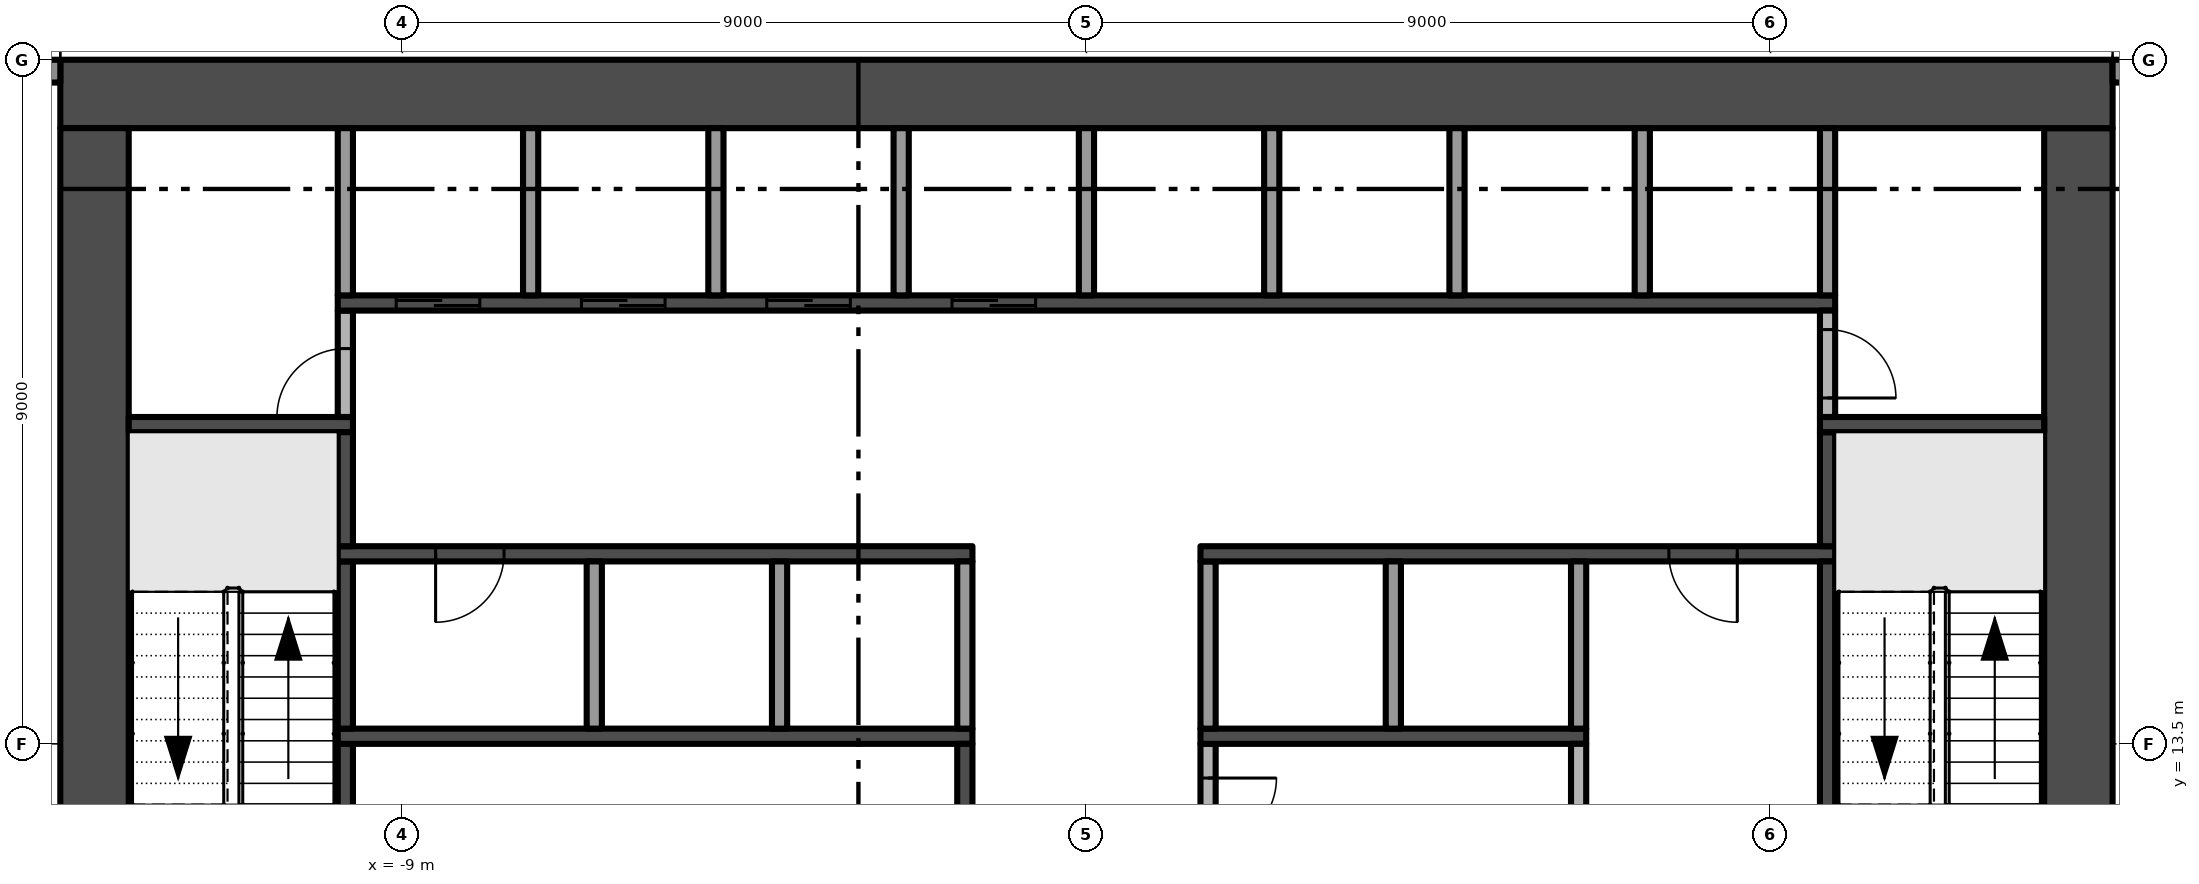
"""IFC4 building model, lengths in metres.
Left out: names, types, materials, properties, quantities, classifications, styles, units other than length and angle.
Written with IfcOpenShell. Run it as: python <this file> out.ifc"""

import sys

from ifc_helpers import new_model, si_unit, direction, frame, frame_2d, origin, place, context, subcontext, project, spatial, rectangle, extrude, element, fill, save


model = new_model("IFC4")
c1 = context("Model", 3, precision=1e-05, world=origin(), true_north=direction((0.0, 1.0)))
c2 = subcontext(c1, "Body", "Model", "MODEL_VIEW")
j1 = project(units=[si_unit("LENGTHUNIT", "METRE"), si_unit("PLANEANGLEUNIT", "RADIAN")], contexts=[c1])
p1 = place(None, origin())
s1 = spatial("IfcSite", under=j1, at=p1, CompositionType="ELEMENT")
p2 = place(p1, origin())
s2 = spatial("IfcBuilding", under=s1, at=p2, CompositionType="ELEMENT")
p3 = place(p2, frame((0.0, 0.0, 69.4)))
s3 = spatial("IfcBuildingStorey", under=s2, at=p3, CompositionType="ELEMENT", Elevation=69.4)
p4 = place(p3, frame((13.05, 5.4, -0.3), z_axis=(0.0, 0.0, 1.0), x_axis=(0.0, 1.0, 0.0)))
e1 = element("IfcWall", 1, at=p4, inside=s3, PredefinedType="SHEAR", context=c2, shape_type="SweptSolid", body=[
    extrude(rectangle(XDim=16.2, YDim=0.9, at=frame_2d((8.1, 0.0))), origin(), (0.0, 0.0, 1.0), 3.8),
])
p5 = place(p4, frame((6.0, 0.0, 0.3)))
e2 = element("IfcOpeningElement", 2, at=p5, cuts=e1, PredefinedType="OPENING", context=c2, shape_type="SweptSolid", body=[
    extrude(rectangle(XDim=1.2, YDim=2.2, at=frame_2d((0.6, 1.1))), frame((0.0, 0.46, 0.0), z_axis=(0.0, -1.0, 0.0), x_axis=(1.0, 0.0, 0.0)), (0.0, 0.0, 1.0), 0.92),
])
p6 = place(p3, frame((13.5, 22.05, -0.3), z_axis=(0.0, 0.0, 1.0), x_axis=(-1.0, 0.0, 0.0)))
e3 = element("IfcWall", 3, at=p6, inside=s3, PredefinedType="SHEAR", context=c2, shape_type="SweptSolid", body=[
    extrude(rectangle(XDim=27.0, YDim=0.9, at=frame_2d((13.5, 0.0))), origin(), (0.0, 0.0, 1.0), 3.8),
])
p7 = place(p3, frame((-13.05, 21.6, -0.3), z_axis=(0.0, 0.0, 1.0), x_axis=(0.0, -1.0, 0.0)))
e4 = element("IfcWall", 4, at=p7, inside=s3, PredefinedType="SHEAR", context=c2, shape_type="SweptSolid", body=[
    extrude(rectangle(XDim=16.2, YDim=0.9, at=frame_2d((8.1, 0.0))), origin(), (0.0, 0.0, 1.0), 3.8),
])
p8 = place(p7, frame((9.0, 0.0, 0.3)))
e5 = element("IfcOpeningElement", 5, at=p8, cuts=e4, PredefinedType="OPENING", context=c2, shape_type="SweptSolid", body=[
    extrude(rectangle(XDim=1.2, YDim=2.2, at=frame_2d((0.6, 1.1))), frame((0.0, 0.46, 0.0), z_axis=(0.0, -1.0, 0.0), x_axis=(1.0, 0.0, 0.0)), (0.0, 0.0, 1.0), 0.92),
])
p9 = place(p3, frame((13.5, 22.35, 0.0), z_axis=(0.0, 0.0, 1.0), x_axis=(1.0, 0.0, 0.0)))
e6 = element("IfcWall", 6, at=p9, inside=s3, PredefinedType="SOLIDWALL", context=c2, shape_type="SweptSolid", body=[
    extrude(rectangle(XDim=3.825, YDim=0.3, at=frame_2d((1.913, 0.0))), origin(), (0.0, 0.0, 1.0), 3.5),
])
p10 = place(p9, frame((0.775, 0.0, 0.0)))
e7 = element("IfcOpeningElement", 7, at=p10, cuts=e6, PredefinedType="OPENING", context=c2, shape_type="SweptSolid", body=[
    extrude(rectangle(XDim=2.725, YDim=2.4, at=frame_2d((1.363, 1.2))), frame((0.0, 0.16, 0.0), z_axis=(0.0, -1.0, 0.0), x_axis=(1.0, 0.0, 0.0)), (0.0, 0.0, 1.0), 0.32),
])
p11 = place(p3, frame((-17.325, 22.35, 0.0), z_axis=(0.0, 0.0, 1.0), x_axis=(1.0, 0.0, 0.0)))
e8 = element("IfcWall", 8, at=p11, inside=s3, PredefinedType="SOLIDWALL", context=c2, shape_type="SweptSolid", body=[
    extrude(rectangle(XDim=3.825, YDim=0.3, at=frame_2d((1.913, 0.0))), origin(), (0.0, 0.0, 1.0), 3.5),
])
p12 = place(p11, frame((0.325, 0.0, 0.45)))
e9 = element("IfcOpeningElement", 9, at=p12, cuts=e8, PredefinedType="OPENING", context=c2, shape_type="SweptSolid", body=[
    extrude(rectangle(XDim=2.725, YDim=2.65, at=frame_2d((1.363, 1.325))), frame((0.0, 0.16, 0.0), z_axis=(0.0, -1.0, 0.0), x_axis=(1.0, 0.0, 0.0)), (0.0, 0.0, 1.0), 0.32),
])
p13 = place(p3, frame((-12.6, 17.7, 0.0), z_axis=(0.0, 0.0, 1.0), x_axis=(1.0, 0.0, 0.0)))
e10 = element("IfcWall", 10, at=p13, inside=s3, PredefinedType="SHEAR", context=c2, shape_type="SweptSolid", body=[
    extrude(rectangle(XDim=2.95, YDim=0.2, at=frame_2d((1.475, 0.0))), origin(), (0.0, 0.0, 1.0), 3.5),
])
p14 = place(p3, frame((-9.75, 10.2, 0.0), z_axis=(0.0, 0.0, 1.0), x_axis=(0.0, 1.0, 0.0)))
e11 = element("IfcWall", 11, at=p14, inside=s3, PredefinedType="SHEAR", context=c2, shape_type="SweptSolid", body=[
    extrude(rectangle(XDim=3.3, YDim=0.2, at=frame_2d((1.65, 0.0))), origin(), (0.0, 0.0, 1.0), 3.5),
])
p15 = place(p3, frame((-9.85, 13.6, 0.0), z_axis=(0.0, 0.0, 1.0), x_axis=(1.0, 0.0, 0.0)))
e12 = element("IfcWall", 12, at=p15, inside=s3, PredefinedType="SHEAR", context=c2, shape_type="SweptSolid", body=[
    extrude(rectangle(XDim=8.35, YDim=0.2, at=frame_2d((4.175, 0.0))), origin(), (0.0, 0.0, 1.0), 3.5),
])
p16 = place(p3, frame((-9.75, 13.7, 0.0), z_axis=(0.0, 0.0, 1.0), x_axis=(0.0, 1.0, 0.0)))
e13 = element("IfcWall", 13, at=p16, inside=s3, PredefinedType="SHEAR", context=c2, shape_type="SweptSolid", body=[
    extrude(rectangle(XDim=2.2, YDim=0.2, at=frame_2d((1.1, 0.0))), origin(), (0.0, 0.0, 1.0), 3.5),
])
p17 = place(p3, frame((-1.5, 16.0, 0.0), z_axis=(0.0, 0.0, 1.0), x_axis=(-1.0, 0.0, 0.0)))
e14 = element("IfcWall", 14, at=p17, inside=s3, PredefinedType="SHEAR", context=c2, shape_type="SweptSolid", body=[
    extrude(rectangle(XDim=8.35, YDim=0.2, at=frame_2d((4.175, 0.0))), origin(), (0.0, 0.0, 1.0), 3.5),
])
p18 = place(p17, frame((6.162, 0.0, 0.0)))
e15 = element("IfcOpeningElement", 15, at=p18, cuts=e14, PredefinedType="OPENING", context=c2, shape_type="SweptSolid", body=[
    extrude(rectangle(XDim=0.9, YDim=2.1, at=frame_2d((0.45, 1.05))), frame((0.0, 0.11, 0.0), z_axis=(0.0, -1.0, 0.0), x_axis=(1.0, 0.0, 0.0)), (0.0, 0.0, 1.0), 0.22),
])
p19 = place(p3, frame((-9.75, 16.1, 0.0), z_axis=(0.0, 0.0, 1.0), x_axis=(0.0, 1.0, 0.0)))
e16 = element("IfcWall", 16, at=p19, inside=s3, PredefinedType="SHEAR", context=c2, shape_type="SweptSolid", body=[
    extrude(rectangle(XDim=1.5, YDim=0.2, at=frame_2d((0.75, 0.0))), origin(), (0.0, 0.0, 1.0), 3.5),
])
p20 = place(p3, frame((-9.75, 17.8, 0.0), z_axis=(0.0, 0.0, 1.0), x_axis=(0.0, 1.0, 0.0)))
e17 = element("IfcWall", 17, at=p20, inside=s3, PredefinedType="PARTITIONING", context=c2, shape_type="SweptSolid", body=[
    extrude(rectangle(XDim=1.4, YDim=0.2, at=frame_2d((0.7, 0.0))), origin(), (0.0, 0.0, 1.0), 3.5),
])
p21 = place(p20, origin())
e18 = element("IfcOpeningElement", 18, at=p21, cuts=e17, PredefinedType="OPENING", context=c2, shape_type="SweptSolid", body=[
    extrude(rectangle(XDim=0.9, YDim=2.1, at=frame_2d((0.45, 1.05))), frame((0.0, 0.11, 0.0), z_axis=(0.0, -1.0, 0.0), x_axis=(1.0, 0.0, 0.0)), (0.0, 0.0, 1.0), 0.22),
])
p22 = place(p3, frame((-9.85, 19.3, 0.0), z_axis=(0.0, 0.0, 1.0), x_axis=(1.0, 0.0, 0.0)))
e19 = element("IfcWall", 19, at=p22, inside=s3, PredefinedType="SHEAR", context=c2, shape_type="SweptSolid", body=[
    extrude(rectangle(XDim=19.7, YDim=0.2, at=frame_2d((9.85, 0.0))), origin(), (0.0, 0.0, 1.0), 3.5),
])
p23 = place(p22, frame((0.769, 0.0, 0.0)))
e20 = element("IfcOpeningElement", 20, at=p23, cuts=e19, PredefinedType="OPENING", context=c2, shape_type="SweptSolid", body=[
    extrude(rectangle(XDim=1.1, YDim=2.1, at=frame_2d((0.55, 1.05))), frame((0.0, 0.11, 0.0), z_axis=(0.0, -1.0, 0.0), x_axis=(1.0, 0.0, 0.0)), (0.0, 0.0, 1.0), 0.22),
])
p24 = place(p22, frame((3.206, 0.0, 0.0)))
e21 = element("IfcOpeningElement", 21, at=p24, cuts=e19, PredefinedType="OPENING", context=c2, shape_type="SweptSolid", body=[
    extrude(rectangle(XDim=1.1, YDim=2.1, at=frame_2d((0.55, 1.05))), frame((0.0, 0.11, 0.0), z_axis=(0.0, -1.0, 0.0), x_axis=(1.0, 0.0, 0.0)), (0.0, 0.0, 1.0), 0.22),
])
p25 = place(p22, frame((5.644, 0.0, 0.0)))
e22 = element("IfcOpeningElement", 22, at=p25, cuts=e19, PredefinedType="OPENING", context=c2, shape_type="SweptSolid", body=[
    extrude(rectangle(XDim=1.1, YDim=2.1, at=frame_2d((0.55, 1.05))), frame((0.0, 0.11, 0.0), z_axis=(0.0, -1.0, 0.0), x_axis=(1.0, 0.0, 0.0)), (0.0, 0.0, 1.0), 0.22),
])
p26 = place(p22, frame((8.081, 0.0, 0.0)))
e23 = element("IfcOpeningElement", 23, at=p26, cuts=e19, PredefinedType="OPENING", context=c2, shape_type="SweptSolid", body=[
    extrude(rectangle(XDim=1.1, YDim=2.1, at=frame_2d((0.55, 1.05))), frame((0.0, 0.11, 0.0), z_axis=(0.0, -1.0, 0.0), x_axis=(1.0, 0.0, 0.0)), (0.0, 0.0, 1.0), 0.22),
])
for number, where, z_axis, x_axis in (
    (24, (-9.75, 19.4, 0.0), (0.0, 0.0, 1.0), (0.0, 1.0, 0.0)),
    (25, (-7.312, 19.4, 0.0), (0.0, 0.0, 1.0), (0.0, 1.0, 0.0)),
    (26, (-6.475, 13.7, 0.0), (0.0, 0.0, 1.0), (0.0, 1.0, 0.0)),
    (27, (-4.875, 19.4, 0.0), (0.0, 0.0, 1.0), (0.0, 1.0, 0.0)),
    (28, (-4.037, 13.7, 0.0), (0.0, 0.0, 1.0), (0.0, 1.0, 0.0)),
    (29, (-2.438, 19.4, 0.0), (0.0, 0.0, 1.0), (0.0, 1.0, 0.0)),
):
    element("IfcWall", number, at=place(p3, frame(where, z_axis=z_axis, x_axis=x_axis)), inside=s3, PredefinedType="PARTITIONING", context=c2, shape_type="SweptSolid", body=[
        extrude(rectangle(XDim=2.2, YDim=0.2, at=frame_2d((1.1, 0.0))), origin(), (0.0, 0.0, 1.0), 3.5),
    ])
p27 = place(p3, frame((-1.6, 8.15, 0.0), z_axis=(0.0, 0.0, 1.0), x_axis=(0.0, 1.0, 0.0)))
e30 = element("IfcWall", 30, at=p27, inside=s3, PredefinedType="SHEAR", context=c2, shape_type="SweptSolid", body=[
    extrude(rectangle(XDim=5.35, YDim=0.2, at=frame_2d((2.675, 0.0))), origin(), (0.0, 0.0, 1.0), 3.5),
])
p28 = place(p27, frame((2.225, 0.0, 0.0)))
e31 = element("IfcOpeningElement", 31, at=p28, cuts=e30, PredefinedType="OPENING", context=c2, shape_type="SweptSolid", body=[
    extrude(rectangle(XDim=0.9, YDim=2.1, at=frame_2d((0.45, 1.05))), frame((0.0, 0.11, 0.0), z_axis=(0.0, -1.0, 0.0), x_axis=(1.0, 0.0, 0.0)), (0.0, 0.0, 1.0), 0.22),
])
for number, where, z_axis, x_axis in (
    (32, (-1.6, 13.7, 0.0), (0.0, 0.0, 1.0), (0.0, 1.0, 0.0)),
    (33, (0.0, 19.4, 0.0), (0.0, 0.0, 1.0), (0.0, 1.0, 0.0)),
):
    element("IfcWall", number, at=place(p3, frame(where, z_axis=z_axis, x_axis=x_axis)), inside=s3, PredefinedType="PARTITIONING", context=c2, shape_type="SweptSolid", body=[
        extrude(rectangle(XDim=2.2, YDim=0.2, at=frame_2d((1.1, 0.0))), origin(), (0.0, 0.0, 1.0), 3.5),
    ])
p29 = place(p3, frame((1.6, 13.5, 0.0), z_axis=(0.0, 0.0, 1.0), x_axis=(0.0, -1.0, 0.0)))
e34 = element("IfcWall", 34, at=p29, inside=s3, PredefinedType="PARTITIONING", context=c2, shape_type="SweptSolid", body=[
    extrude(rectangle(XDim=1.8, YDim=0.2, at=frame_2d((0.9, 0.0))), origin(), (0.0, 0.0, 1.0), 3.5),
])
p30 = place(p29, frame((0.45, 0.0, 0.0)))
e35 = element("IfcOpeningElement", 35, at=p30, cuts=e34, PredefinedType="OPENING", context=c2, shape_type="SweptSolid", body=[
    extrude(rectangle(XDim=0.9, YDim=2.1, at=frame_2d((0.45, 1.05))), frame((0.0, 0.11, 0.0), z_axis=(0.0, -1.0, 0.0), x_axis=(1.0, 0.0, 0.0)), (0.0, 0.0, 1.0), 0.22),
])
p31 = place(p3, frame((1.5, 13.6, 0.0), z_axis=(0.0, 0.0, 1.0), x_axis=(1.0, 0.0, 0.0)))
e36 = element("IfcWall", 36, at=p31, inside=s3, PredefinedType="SHEAR", context=c2, shape_type="SweptSolid", body=[
    extrude(rectangle(XDim=5.075, YDim=0.2, at=frame_2d((2.538, 0.0))), origin(), (0.0, 0.0, 1.0), 3.5),
])
p32 = place(p3, frame((1.6, 13.7, 0.0), z_axis=(0.0, 0.0, 1.0), x_axis=(0.0, 1.0, 0.0)))
e37 = element("IfcWall", 37, at=p32, inside=s3, PredefinedType="PARTITIONING", context=c2, shape_type="SweptSolid", body=[
    extrude(rectangle(XDim=2.2, YDim=0.2, at=frame_2d((1.1, 0.0))), origin(), (0.0, 0.0, 1.0), 3.5),
])
p33 = place(p3, frame((9.85, 16.0, 0.0), z_axis=(0.0, 0.0, 1.0), x_axis=(-1.0, 0.0, 0.0)))
e38 = element("IfcWall", 38, at=p33, inside=s3, PredefinedType="SHEAR", context=c2, shape_type="SweptSolid", body=[
    extrude(rectangle(XDim=8.35, YDim=0.2, at=frame_2d((4.175, 0.0))), origin(), (0.0, 0.0, 1.0), 3.5),
])
p34 = place(p33, frame((1.288, 0.0, 0.0)))
e39 = element("IfcOpeningElement", 39, at=p34, cuts=e38, PredefinedType="OPENING", context=c2, shape_type="SweptSolid", body=[
    extrude(rectangle(XDim=0.9, YDim=2.1, at=frame_2d((0.45, 1.05))), frame((0.0, 0.11, 0.0), z_axis=(0.0, -1.0, 0.0), x_axis=(1.0, 0.0, 0.0)), (0.0, 0.0, 1.0), 0.22),
])
for number, where, z_axis, x_axis in (
    (40, (2.438, 19.4, 0.0), (0.0, 0.0, 1.0), (0.0, 1.0, 0.0)),
    (41, (4.037, 13.7, 0.0), (0.0, 0.0, 1.0), (0.0, 1.0, 0.0)),
    (42, (4.875, 19.4, 0.0), (0.0, 0.0, 1.0), (0.0, 1.0, 0.0)),
):
    element("IfcWall", number, at=place(p3, frame(where, z_axis=z_axis, x_axis=x_axis)), inside=s3, PredefinedType="PARTITIONING", context=c2, shape_type="SweptSolid", body=[
        extrude(rectangle(XDim=2.2, YDim=0.2, at=frame_2d((1.1, 0.0))), origin(), (0.0, 0.0, 1.0), 3.5),
    ])
p35 = place(p3, frame((6.475, 12.3, 0.0), z_axis=(0.0, 0.0, 1.0), x_axis=(0.0, 1.0, 0.0)))
e43 = element("IfcWall", 43, at=p35, inside=s3, PredefinedType="PARTITIONING", context=c2, shape_type="SweptSolid", body=[
    extrude(rectangle(XDim=1.2, YDim=0.2, at=frame_2d((0.6, 0.0))), origin(), (0.0, 0.0, 1.0), 3.5),
])
for number, where, z_axis, x_axis in (
    (44, (6.475, 13.7, 0.0), (0.0, 0.0, 1.0), (0.0, 1.0, 0.0)),
    (45, (7.312, 19.4, 0.0), (0.0, 0.0, 1.0), (0.0, 1.0, 0.0)),
):
    element("IfcWall", number, at=place(p3, frame(where, z_axis=z_axis, x_axis=x_axis)), inside=s3, PredefinedType="PARTITIONING", context=c2, shape_type="SweptSolid", body=[
        extrude(rectangle(XDim=2.2, YDim=0.2, at=frame_2d((1.1, 0.0))), origin(), (0.0, 0.0, 1.0), 3.5),
    ])
p36 = place(p3, frame((9.75, 12.3, 0.0), z_axis=(0.0, 0.0, 1.0), x_axis=(0.0, 1.0, 0.0)))
e46 = element("IfcWall", 46, at=p36, inside=s3, PredefinedType="SHEAR", context=c2, shape_type="SweptSolid", body=[
    extrude(rectangle(XDim=3.6, YDim=0.2, at=frame_2d((1.8, 0.0))), origin(), (0.0, 0.0, 1.0), 3.5),
])
p37 = place(p3, frame((9.75, 16.1, 0.0), z_axis=(0.0, 0.0, 1.0), x_axis=(0.0, 1.0, 0.0)))
e47 = element("IfcWall", 47, at=p37, inside=s3, PredefinedType="SHEAR", context=c2, shape_type="SweptSolid", body=[
    extrude(rectangle(XDim=1.5, YDim=0.2, at=frame_2d((0.75, 0.0))), origin(), (0.0, 0.0, 1.0), 3.5),
])
p38 = place(p3, frame((9.65, 17.7, 0.0), z_axis=(0.0, 0.0, 1.0), x_axis=(1.0, 0.0, 0.0)))
e48 = element("IfcWall", 48, at=p38, inside=s3, PredefinedType="SHEAR", context=c2, shape_type="SweptSolid", body=[
    extrude(rectangle(XDim=2.95, YDim=0.2, at=frame_2d((1.475, 0.0))), origin(), (0.0, 0.0, 1.0), 3.5),
])
p39 = place(p3, frame((9.75, 19.2, 0.0), z_axis=(0.0, 0.0, 1.0), x_axis=(0.0, -1.0, 0.0)))
e49 = element("IfcWall", 49, at=p39, inside=s3, PredefinedType="PARTITIONING", context=c2, shape_type="SweptSolid", body=[
    extrude(rectangle(XDim=1.4, YDim=0.2, at=frame_2d((0.7, 0.0))), origin(), (0.0, 0.0, 1.0), 3.5),
])
p40 = place(p39, frame((0.25, 0.0, 0.0)))
e50 = element("IfcOpeningElement", 50, at=p40, cuts=e49, PredefinedType="OPENING", context=c2, shape_type="SweptSolid", body=[
    extrude(rectangle(XDim=0.9, YDim=2.1, at=frame_2d((0.45, 1.05))), frame((0.0, 0.11, 0.0), z_axis=(0.0, -1.0, 0.0), x_axis=(1.0, 0.0, 0.0)), (0.0, 0.0, 1.0), 0.22),
])
p41 = place(p3, frame((9.75, 19.4, 0.0), z_axis=(0.0, 0.0, 1.0), x_axis=(0.0, 1.0, 0.0)))
e51 = element("IfcWall", 51, at=p41, inside=s3, PredefinedType="PARTITIONING", context=c2, shape_type="SweptSolid", body=[
    extrude(rectangle(XDim=2.2, YDim=0.2, at=frame_2d((1.1, 0.0))), origin(), (0.0, 0.0, 1.0), 3.5),
])
p42 = place(p23, origin())
e52 = element("IfcDoor", 52, at=p42, inside=s3, OperationType="SLIDING_TO_LEFT", PredefinedType="DOOR", context=c2, shape_type="SweptSolid", body=[
    extrude(rectangle(XDim=1.1, YDim=2.1, at=frame_2d((0.55, 1.05))), frame((0.0, 0.025, 0.0), z_axis=(0.0, -1.0, 0.0), x_axis=(1.0, 0.0, 0.0)), (0.0, 0.0, 1.0), 0.05),
])
fill(e20, e52)
p43 = place(p24, origin())
e53 = element("IfcDoor", 53, at=p43, inside=s3, OperationType="SLIDING_TO_LEFT", PredefinedType="DOOR", context=c2, shape_type="SweptSolid", body=[
    extrude(rectangle(XDim=1.1, YDim=2.1, at=frame_2d((0.55, 1.05))), frame((0.0, 0.025, 0.0), z_axis=(0.0, -1.0, 0.0), x_axis=(1.0, 0.0, 0.0)), (0.0, 0.0, 1.0), 0.05),
])
fill(e21, e53)
p44 = place(p25, origin())
e54 = element("IfcDoor", 54, at=p44, inside=s3, OperationType="SLIDING_TO_LEFT", PredefinedType="DOOR", context=c2, shape_type="SweptSolid", body=[
    extrude(rectangle(XDim=1.1, YDim=2.1, at=frame_2d((0.55, 1.05))), frame((0.0, 0.025, 0.0), z_axis=(0.0, -1.0, 0.0), x_axis=(1.0, 0.0, 0.0)), (0.0, 0.0, 1.0), 0.05),
])
fill(e22, e54)
p45 = place(p26, origin())
e55 = element("IfcDoor", 55, at=p45, inside=s3, OperationType="SLIDING_TO_LEFT", PredefinedType="DOOR", context=c2, shape_type="SweptSolid", body=[
    extrude(rectangle(XDim=1.1, YDim=2.1, at=frame_2d((0.55, 1.05))), frame((0.0, 0.025, 0.0), z_axis=(0.0, -1.0, 0.0), x_axis=(1.0, 0.0, 0.0)), (0.0, 0.0, 1.0), 0.05),
])
fill(e23, e55)
p46 = place(p18, origin())
e56 = element("IfcDoor", 56, at=p46, inside=s3, OperationType="SINGLE_SWING_RIGHT", PredefinedType="DOOR", context=c2, shape_type="SweptSolid", body=[
    extrude(rectangle(XDim=0.9, YDim=2.1, at=frame_2d((0.45, 1.05))), frame((0.0, 0.025, 0.0), z_axis=(0.0, -1.0, 0.0), x_axis=(1.0, 0.0, 0.0)), (0.0, 0.0, 1.0), 0.05),
])
fill(e15, e56)
p47 = place(p30, origin())
e57 = element("IfcDoor", 57, at=p47, inside=s3, OperationType="SINGLE_SWING_LEFT", PredefinedType="DOOR", context=c2, shape_type="SweptSolid", body=[
    extrude(rectangle(XDim=0.9, YDim=2.1, at=frame_2d((0.45, 1.05))), frame((0.0, 0.025, 0.0), z_axis=(0.0, -1.0, 0.0), x_axis=(1.0, 0.0, 0.0)), (0.0, 0.0, 1.0), 0.05),
])
fill(e35, e57)
p48 = place(p34, origin())
e58 = element("IfcDoor", 58, at=p48, inside=s3, OperationType="SINGLE_SWING_LEFT", PredefinedType="DOOR", context=c2, shape_type="SweptSolid", body=[
    extrude(rectangle(XDim=0.9, YDim=2.1, at=frame_2d((0.45, 1.05))), frame((0.0, 0.025, 0.0), z_axis=(0.0, -1.0, 0.0), x_axis=(1.0, 0.0, 0.0)), (0.0, 0.0, 1.0), 0.05),
])
fill(e39, e58)
p49 = place(p21, origin())
e59 = element("IfcDoor", 59, at=p49, inside=s3, OperationType="SINGLE_SWING_LEFT", PredefinedType="DOOR", context=c2, shape_type="SweptSolid", body=[
    extrude(rectangle(XDim=0.9, YDim=2.1, at=frame_2d((0.45, 1.05))), frame((0.0, 0.025, 0.0), z_axis=(0.0, -1.0, 0.0), x_axis=(1.0, 0.0, 0.0)), (0.0, 0.0, 1.0), 0.05),
])
fill(e18, e59)
p50 = place(p40, origin())
e60 = element("IfcDoor", 60, at=p50, inside=s3, OperationType="SINGLE_SWING_RIGHT", PredefinedType="DOOR", context=c2, shape_type="SweptSolid", body=[
    extrude(rectangle(XDim=0.9, YDim=2.1, at=frame_2d((0.45, 1.05))), frame((0.0, 0.025, 0.0), z_axis=(0.0, -1.0, 0.0), x_axis=(1.0, 0.0, 0.0)), (0.0, 0.0, 1.0), 0.05),
])
fill(e50, e60)
save(model, sys.argv[1])
